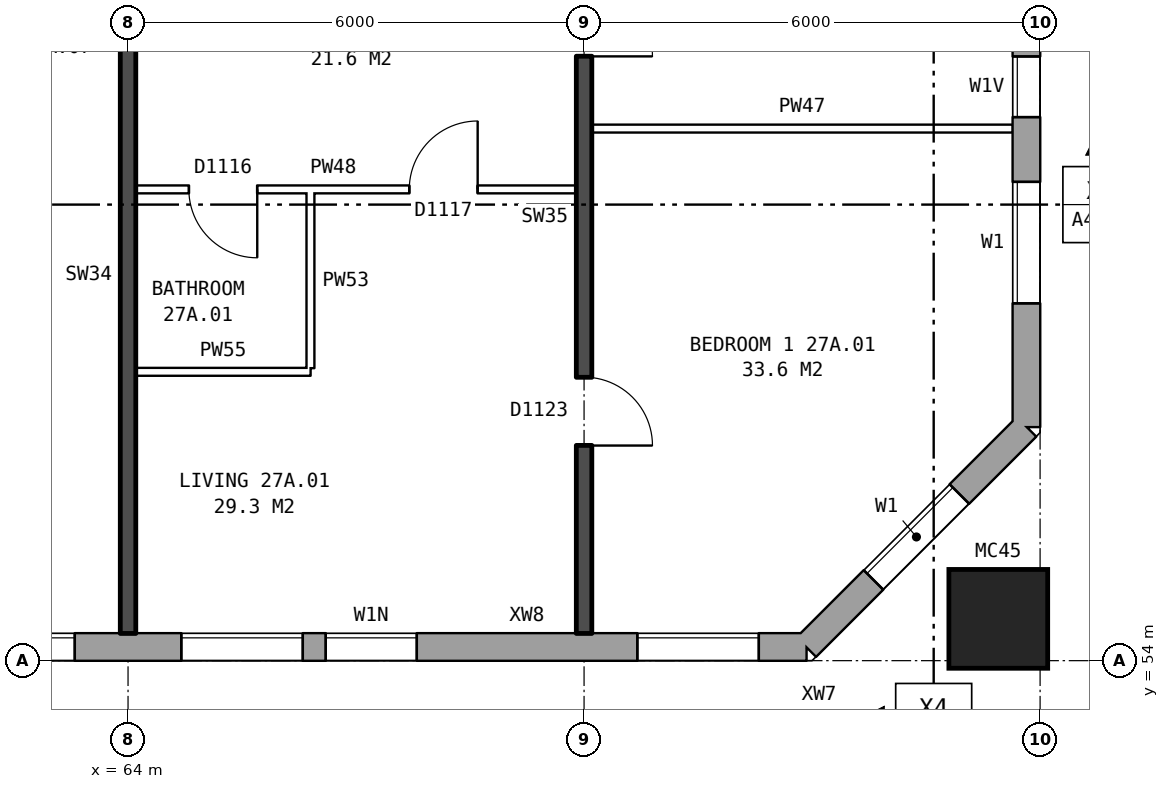
"""IFC4 building model, lengths in metres.
Left out: names, types, materials, properties, quantities, classifications, styles, units other than length and angle.
Written with IfcOpenShell. Run it as: python <this file> out.ifc"""

import sys

from ifc_helpers import new_model, si_unit, direction, frame, frame_2d, origin, origin_2d, place, context, subcontext, project, spatial, rectangle, hollow_rectangle, extrude, element, fill, save


model = new_model("IFC4")
c1 = context("Model", 3, precision=1e-05, world=origin(), true_north=direction((0.0, 1.0)))
c2 = subcontext(c1, "Body", "Model", "MODEL_VIEW")
j1 = project(units=[si_unit("LENGTHUNIT", "METRE"), si_unit("PLANEANGLEUNIT", "RADIAN")], contexts=[c1])
p1 = place(None, origin())
s1 = spatial("IfcSite", under=j1, at=p1, CompositionType="ELEMENT")
p2 = place(p1, origin())
s2 = spatial("IfcBuilding", under=s1, at=p2, CompositionType="ELEMENT")
p3 = place(p2, frame((0.0, 0.0, 99.5)))
s3 = spatial("IfcBuildingStorey", under=s2, at=p3, CompositionType="ELEMENT", Elevation=99.5)
p4 = place(p3, frame((75.45, 54.55, 0.0), z_axis=(0.0, 0.0, 1.0), x_axis=(1.0, 0.0, 0.0)))
e1 = element("IfcColumn", 1, at=p4, inside=s3, PredefinedType="COLUMN", context=c2, shape_type="SweptSolid", body=[
    extrude(hollow_rectangle(XDim=1.3, YDim=1.3, WallThickness=0.07, at=origin_2d()), origin(), (0.0, 0.0, 1.0), 3.1),
])
p5 = place(p3, frame((28.075, 54.18, 0.0), z_axis=(0.0, 0.0, 1.0), x_axis=(1.0, 0.0, 0.0)))
e2 = element("IfcWall", 2, at=p5, inside=s3, PredefinedType="STANDARD", context=c2, shape_type="SweptSolid", body=[
    extrude(rectangle(XDim=44.851, YDim=0.36, at=frame_2d((22.425, 0.0))), origin(), (0.0, 0.0, 1.0), 2.85),
])
p6 = place(p5, frame((0.625, 0.0, 0.8)))
e3 = element("IfcOpeningElement", 3, at=p6, cuts=e2, PredefinedType="OPENING", context=c2, shape_type="SweptSolid", body=[
    extrude(rectangle(XDim=1.6, YDim=1.8, at=frame_2d((0.8, 0.9))), frame((0.0, 0.19, 0.0), z_axis=(0.0, -1.0, 0.0), x_axis=(1.0, 0.0, 0.0)), (0.0, 0.0, 1.0), 0.38),
])
p7 = place(p5, frame((2.55, 0.0, 1.7)))
e4 = element("IfcOpeningElement", 4, at=p7, cuts=e2, PredefinedType="OPENING", context=c2, shape_type="SweptSolid", body=[
    extrude(rectangle(XDim=0.8, YDim=0.9, at=frame_2d((0.4, 0.45))), frame((0.0, 0.19, 0.0), z_axis=(0.0, -1.0, 0.0), x_axis=(1.0, 0.0, 0.0)), (0.0, 0.0, 1.0), 0.38),
])
p8 = place(p5, frame((6.625, 0.0, 0.8)))
e5 = element("IfcOpeningElement", 5, at=p8, cuts=e2, PredefinedType="OPENING", context=c2, shape_type="SweptSolid", body=[
    extrude(rectangle(XDim=1.6, YDim=1.8, at=frame_2d((0.8, 0.9))), frame((0.0, 0.19, 0.0), z_axis=(0.0, -1.0, 0.0), x_axis=(1.0, 0.0, 0.0)), (0.0, 0.0, 1.0), 0.38),
])
p9 = place(p5, frame((9.625, 0.0, 0.8)))
e6 = element("IfcOpeningElement", 6, at=p9, cuts=e2, PredefinedType="OPENING", context=c2, shape_type="SweptSolid", body=[
    extrude(rectangle(XDim=1.6, YDim=1.8, at=frame_2d((0.8, 0.9))), frame((0.0, 0.19, 0.0), z_axis=(0.0, -1.0, 0.0), x_axis=(1.0, 0.0, 0.0)), (0.0, 0.0, 1.0), 0.38),
])
p10 = place(p5, frame((12.625, 0.0, 0.8)))
e7 = element("IfcOpeningElement", 7, at=p10, cuts=e2, PredefinedType="OPENING", context=c2, shape_type="SweptSolid", body=[
    extrude(rectangle(XDim=1.6, YDim=1.8, at=frame_2d((0.8, 0.9))), frame((0.0, 0.19, 0.0), z_axis=(0.0, -1.0, 0.0), x_axis=(1.0, 0.0, 0.0)), (0.0, 0.0, 1.0), 0.38),
])
p11 = place(p5, frame((15.625, 0.0, 0.8)))
e8 = element("IfcOpeningElement", 8, at=p11, cuts=e2, PredefinedType="OPENING", context=c2, shape_type="SweptSolid", body=[
    extrude(rectangle(XDim=1.6, YDim=1.8, at=frame_2d((0.8, 0.9))), frame((0.0, 0.19, 0.0), z_axis=(0.0, -1.0, 0.0), x_axis=(1.0, 0.0, 0.0)), (0.0, 0.0, 1.0), 0.38),
])
p12 = place(p5, frame((18.625, 0.0, 0.8)))
e9 = element("IfcOpeningElement", 9, at=p12, cuts=e2, PredefinedType="OPENING", context=c2, shape_type="SweptSolid", body=[
    extrude(rectangle(XDim=1.6, YDim=1.8, at=frame_2d((0.8, 0.9))), frame((0.0, 0.19, 0.0), z_axis=(0.0, -1.0, 0.0), x_axis=(1.0, 0.0, 0.0)), (0.0, 0.0, 1.0), 0.38),
])
p13 = place(p5, frame((21.625, 0.0, 0.8)))
e10 = element("IfcOpeningElement", 10, at=p13, cuts=e2, PredefinedType="OPENING", context=c2, shape_type="SweptSolid", body=[
    extrude(rectangle(XDim=1.6, YDim=1.8, at=frame_2d((0.8, 0.9))), frame((0.0, 0.19, 0.0), z_axis=(0.0, -1.0, 0.0), x_axis=(1.0, 0.0, 0.0)), (0.0, 0.0, 1.0), 0.38),
])
p14 = place(p5, frame((24.625, 0.0, 0.8)))
e11 = element("IfcOpeningElement", 11, at=p14, cuts=e2, PredefinedType="OPENING", context=c2, shape_type="SweptSolid", body=[
    extrude(rectangle(XDim=1.6, YDim=1.8, at=frame_2d((0.8, 0.9))), frame((0.0, 0.19, 0.0), z_axis=(0.0, -1.0, 0.0), x_axis=(1.0, 0.0, 0.0)), (0.0, 0.0, 1.0), 0.38),
])
p15 = place(p5, frame((27.625, 0.0, 0.8)))
e12 = element("IfcOpeningElement", 12, at=p15, cuts=e2, PredefinedType="OPENING", context=c2, shape_type="SweptSolid", body=[
    extrude(rectangle(XDim=1.6, YDim=1.8, at=frame_2d((0.8, 0.9))), frame((0.0, 0.19, 0.0), z_axis=(0.0, -1.0, 0.0), x_axis=(1.0, 0.0, 0.0)), (0.0, 0.0, 1.0), 0.38),
])
p16 = place(p5, frame((30.625, 0.0, 0.8)))
e13 = element("IfcOpeningElement", 13, at=p16, cuts=e2, PredefinedType="OPENING", context=c2, shape_type="SweptSolid", body=[
    extrude(rectangle(XDim=1.6, YDim=1.8, at=frame_2d((0.8, 0.9))), frame((0.0, 0.19, 0.0), z_axis=(0.0, -1.0, 0.0), x_axis=(1.0, 0.0, 0.0)), (0.0, 0.0, 1.0), 0.38),
])
p17 = place(p5, frame((33.625, 0.0, 0.8)))
e14 = element("IfcOpeningElement", 14, at=p17, cuts=e2, PredefinedType="OPENING", context=c2, shape_type="SweptSolid", body=[
    extrude(rectangle(XDim=1.6, YDim=1.8, at=frame_2d((0.8, 0.9))), frame((0.0, 0.19, 0.0), z_axis=(0.0, -1.0, 0.0), x_axis=(1.0, 0.0, 0.0)), (0.0, 0.0, 1.0), 0.38),
])
p18 = place(p5, frame((36.625, 0.0, 0.8)))
e15 = element("IfcOpeningElement", 15, at=p18, cuts=e2, PredefinedType="OPENING", context=c2, shape_type="SweptSolid", body=[
    extrude(rectangle(XDim=1.6, YDim=1.8, at=frame_2d((0.8, 0.9))), frame((0.0, 0.19, 0.0), z_axis=(0.0, -1.0, 0.0), x_axis=(1.0, 0.0, 0.0)), (0.0, 0.0, 1.0), 0.38),
])
p19 = place(p5, frame((38.525, 0.0, 0.8)))
e16 = element("IfcOpeningElement", 16, at=p19, cuts=e2, PredefinedType="OPENING", context=c2, shape_type="SweptSolid", body=[
    extrude(rectangle(XDim=1.2, YDim=1.2, at=frame_2d((0.6, 0.6))), frame((0.0, 0.19, 0.0), z_axis=(0.0, -1.0, 0.0), x_axis=(1.0, 0.0, 0.0)), (0.0, 0.0, 1.0), 0.38),
])
p20 = place(p5, frame((42.625, 0.0, 0.8)))
e17 = element("IfcOpeningElement", 17, at=p20, cuts=e2, PredefinedType="OPENING", context=c2, shape_type="SweptSolid", body=[
    extrude(rectangle(XDim=1.6, YDim=1.8, at=frame_2d((0.8, 0.9))), frame((0.0, 0.19, 0.0), z_axis=(0.0, -1.0, 0.0), x_axis=(1.0, 0.0, 0.0)), (0.0, 0.0, 1.0), 0.38),
])
p21 = place(p5, frame((4.65, 0.0, 0.8)))
e18 = element("IfcOpeningElement", 18, at=p21, cuts=e2, PredefinedType="OPENING", context=c2, shape_type="SweptSolid", body=[
    extrude(rectangle(XDim=1.0, YDim=0.9, at=frame_2d((0.5, 0.45))), frame((0.0, 0.19, 0.0), z_axis=(0.0, -1.0, 0.0), x_axis=(1.0, 0.0, 0.0)), (0.0, 0.0, 1.0), 0.38),
])
p22 = place(p3, frame((72.925, 54.18, 0.0), z_axis=(0.0, 0.0, 1.0), x_axis=(0.707106781187, 0.707106781187, 0.0)))
e19 = element("IfcWall", 19, at=p22, inside=s3, PredefinedType="STANDARD", context=c2, shape_type="SweptSolid", body=[
    extrude(rectangle(XDim=4.094, YDim=0.36, at=frame_2d((2.047, 0.0))), origin(), (0.0, 0.0, 1.0), 2.85),
])
p23 = place(p22, frame((1.247, 0.0, 0.8)))
e20 = element("IfcOpeningElement", 20, at=p23, cuts=e19, PredefinedType="OPENING", context=c2, shape_type="SweptSolid", body=[
    extrude(rectangle(XDim=1.6, YDim=1.8, at=frame_2d((0.8, 0.9))), frame((0.0, 0.19, 0.0), z_axis=(0.0, -1.0, 0.0), x_axis=(1.0, 0.0, 0.0)), (0.0, 0.0, 1.0), 0.38),
])
p24 = place(p3, frame((75.82, 57.075, 0.0), z_axis=(0.0, 0.0, 1.0), x_axis=(0.0, 1.0, 0.0)))
e21 = element("IfcWall", 21, at=p24, inside=s3, PredefinedType="STANDARD", context=c2, shape_type="SweptSolid", body=[
    extrude(rectangle(XDim=25.851, YDim=0.36, at=frame_2d((12.925, 0.0))), origin(), (0.0, 0.0, 1.0), 2.85),
])
p25 = place(p24, frame((1.625, 0.0, 0.8)))
e22 = element("IfcOpeningElement", 22, at=p25, cuts=e21, PredefinedType="OPENING", context=c2, shape_type="SweptSolid", body=[
    extrude(rectangle(XDim=1.6, YDim=1.8, at=frame_2d((0.8, 0.9))), frame((0.0, 0.19, 0.0), z_axis=(0.0, -1.0, 0.0), x_axis=(1.0, 0.0, 0.0)), (0.0, 0.0, 1.0), 0.38),
])
p26 = place(p24, frame((4.075, 0.0, 1.65)))
e23 = element("IfcOpeningElement", 23, at=p26, cuts=e21, PredefinedType="OPENING", context=c2, shape_type="SweptSolid", body=[
    extrude(rectangle(XDim=0.8, YDim=0.9, at=frame_2d((0.4, 0.45))), frame((0.0, 0.19, 0.0), z_axis=(0.0, -1.0, 0.0), x_axis=(1.0, 0.0, 0.0)), (0.0, 0.0, 1.0), 0.38),
])
p27 = place(p24, frame((20.775, 0.0, 1.7)))
e24 = element("IfcOpeningElement", 24, at=p27, cuts=e21, PredefinedType="OPENING", context=c2, shape_type="SweptSolid", body=[
    extrude(rectangle(XDim=1.4, YDim=0.9, at=frame_2d((0.7, 0.45))), frame((0.0, 0.19, 0.0), z_axis=(0.0, -1.0, 0.0), x_axis=(1.0, 0.0, 0.0)), (0.0, 0.0, 1.0), 0.38),
])
p28 = place(p24, frame((22.625, 0.0, 0.8)))
e25 = element("IfcOpeningElement", 25, at=p28, cuts=e21, PredefinedType="OPENING", context=c2, shape_type="SweptSolid", body=[
    extrude(rectangle(XDim=1.6, YDim=1.8, at=frame_2d((0.8, 0.9))), frame((0.0, 0.19, 0.0), z_axis=(0.0, -1.0, 0.0), x_axis=(1.0, 0.0, 0.0)), (0.0, 0.0, 1.0), 0.38),
])
p29 = place(p24, frame((5.575, 0.0, 0.45)))
e26 = element("IfcOpeningElement", 26, at=p29, cuts=e21, PredefinedType="OPENING", context=c2, shape_type="SweptSolid", body=[
    extrude(rectangle(XDim=1.0, YDim=0.9, at=frame_2d((0.5, 0.45))), frame((0.0, 0.19, 0.0), z_axis=(0.0, -1.0, 0.0), x_axis=(1.0, 0.0, 0.0)), (0.0, 0.0, 1.0), 0.38),
])
p30 = place(p3, frame((64.1, 57.8, 0.0), z_axis=(0.0, 0.0, 1.0), x_axis=(1.0, 0.0, 0.0)))
e27 = element("IfcWall", 27, at=p30, inside=s3, PredefinedType="PARTITIONING", context=c2, shape_type="SweptSolid", body=[
    extrude(rectangle(XDim=2.3, YDim=0.1, at=frame_2d((1.15, 0.0))), origin(), (0.0, 0.0, 1.0), 2.85),
])
p31 = place(p3, frame((64.1, 60.2, 0.0), z_axis=(0.0, 0.0, 1.0), x_axis=(1.0, 0.0, 0.0)))
e28 = element("IfcWall", 28, at=p31, inside=s3, PredefinedType="PARTITIONING", context=c2, shape_type="SweptSolid", body=[
    extrude(rectangle(XDim=5.8, YDim=0.1, at=frame_2d((2.9, 0.0))), origin(), (0.0, 0.0, 1.0), 2.85),
])
p32 = place(p31, frame((3.6, 0.0, 0.0)))
e29 = element("IfcOpeningElement", 29, at=p32, cuts=e28, PredefinedType="OPENING", context=c2, shape_type="SweptSolid", body=[
    extrude(rectangle(XDim=0.9, YDim=2.1, at=frame_2d((0.45, 1.05))), frame((0.0, 0.06, 0.0), z_axis=(0.0, -1.0, 0.0), x_axis=(1.0, 0.0, 0.0)), (0.0, 0.0, 1.0), 0.12),
])
p33 = place(p31, frame((0.7, 0.0, 0.0)))
e30 = element("IfcOpeningElement", 30, at=p33, cuts=e28, PredefinedType="OPENING", context=c2, shape_type="SweptSolid", body=[
    extrude(rectangle(XDim=0.9, YDim=2.1, at=frame_2d((0.45, 1.05))), frame((0.0, 0.06, 0.0), z_axis=(0.0, -1.0, 0.0), x_axis=(1.0, 0.0, 0.0)), (0.0, 0.0, 1.0), 0.12),
])
p34 = place(p3, frame((70.1, 61.0, 0.0), z_axis=(0.0, 0.0, 1.0), x_axis=(1.0, 0.0, 0.0)))
e31 = element("IfcWall", 31, at=p34, inside=s3, PredefinedType="PARTITIONING", context=c2, shape_type="SweptSolid", body=[
    extrude(rectangle(XDim=5.54, YDim=0.1, at=frame_2d((2.77, 0.0))), origin(), (0.0, 0.0, 1.0), 2.85),
])
p35 = place(p3, frame((64.0, 54.36, 0.0), z_axis=(0.0, 0.0, 1.0), x_axis=(0.0, 1.0, 0.0)))
e32 = element("IfcWall", 32, at=p35, inside=s3, PredefinedType="SOLIDWALL", context=c2, shape_type="SweptSolid", body=[
    extrude(rectangle(XDim=9.44, YDim=0.2, at=frame_2d((4.72, 0.0))), origin(), (0.0, 0.0, 1.0), 2.85),
])
p36 = place(p3, frame((66.4, 57.85, 0.0), z_axis=(0.0, 0.0, 1.0), x_axis=(0.0, 1.0, 0.0)))
e33 = element("IfcWall", 33, at=p36, inside=s3, PredefinedType="PARTITIONING", context=c2, shape_type="SweptSolid", body=[
    extrude(rectangle(XDim=2.3, YDim=0.1, at=frame_2d((1.15, 0.0))), origin(), (0.0, 0.0, 1.0), 2.85),
])
p37 = place(p3, frame((70.0, 54.36, 0.0), z_axis=(0.0, 0.0, 1.0), x_axis=(0.0, 1.0, 0.0)))
e34 = element("IfcWall", 34, at=p37, inside=s3, PredefinedType="SOLIDWALL", context=c2, shape_type="SweptSolid", body=[
    extrude(rectangle(XDim=9.44, YDim=0.2, at=frame_2d((4.72, 0.0))), origin(), (0.0, 0.0, 1.0), 2.85),
])
p38 = place(p37, frame((2.47, 0.0, 0.0)))
e35 = element("IfcOpeningElement", 35, at=p38, cuts=e34, PredefinedType="OPENING", context=c2, shape_type="SweptSolid", body=[
    extrude(rectangle(XDim=0.9, YDim=2.1, at=frame_2d((0.45, 1.05))), frame((0.0, 0.11, 0.0), z_axis=(0.0, -1.0, 0.0), x_axis=(1.0, 0.0, 0.0)), (0.0, 0.0, 1.0), 0.22),
])
p39 = place(p37, frame((7.59, 0.0, 0.0)))
e36 = element("IfcOpeningElement", 36, at=p39, cuts=e34, PredefinedType="OPENING", context=c2, shape_type="SweptSolid", body=[
    extrude(rectangle(XDim=0.9, YDim=2.1, at=frame_2d((0.45, 1.05))), frame((0.0, 0.11, 0.0), z_axis=(0.0, -1.0, 0.0), x_axis=(1.0, 0.0, 0.0)), (0.0, 0.0, 1.0), 0.22),
])
p40 = place(p17, origin())
e37 = element("IfcWindow", 37, at=p40, inside=s3, PartitioningType="SINGLE_PANEL", PredefinedType="WINDOW", context=c2, shape_type="SweptSolid", body=[
    extrude(rectangle(XDim=1.6, YDim=1.8, at=frame_2d((0.8, 0.9))), frame((0.0, 0.15, 0.0), z_axis=(0.0, -1.0, 0.0), x_axis=(1.0, 0.0, 0.0)), (0.0, 0.0, 1.0), 0.06),
])
fill(e14, e37)
p41 = place(p18, origin())
e38 = element("IfcWindow", 38, at=p41, inside=s3, PartitioningType="SINGLE_PANEL", PredefinedType="WINDOW", context=c2, shape_type="SweptSolid", body=[
    extrude(rectangle(XDim=1.6, YDim=1.8, at=frame_2d((0.8, 0.9))), frame((0.0, 0.15, 0.0), z_axis=(0.0, -1.0, 0.0), x_axis=(1.0, 0.0, 0.0)), (0.0, 0.0, 1.0), 0.06),
])
fill(e15, e38)
p42 = place(p19, origin())
e39 = element("IfcWindow", 39, at=p42, inside=s3, PartitioningType="SINGLE_PANEL", PredefinedType="WINDOW", context=c2, shape_type="SweptSolid", body=[
    extrude(rectangle(XDim=1.2, YDim=1.2, at=frame_2d((0.6, 0.6))), frame((0.0, 0.15, 0.0), z_axis=(0.0, -1.0, 0.0), x_axis=(1.0, 0.0, 0.0)), (0.0, 0.0, 1.0), 0.06),
])
fill(e16, e39)
p43 = place(p20, origin())
e40 = element("IfcWindow", 40, at=p43, inside=s3, PartitioningType="SINGLE_PANEL", PredefinedType="WINDOW", context=c2, shape_type="SweptSolid", body=[
    extrude(rectangle(XDim=1.6, YDim=1.8, at=frame_2d((0.8, 0.9))), frame((0.0, 0.15, 0.0), z_axis=(0.0, -1.0, 0.0), x_axis=(1.0, 0.0, 0.0)), (0.0, 0.0, 1.0), 0.06),
])
fill(e17, e40)
p44 = place(p23, origin())
e41 = element("IfcWindow", 41, at=p44, inside=s3, PartitioningType="SINGLE_PANEL", PredefinedType="WINDOW", context=c2, shape_type="SweptSolid", body=[
    extrude(rectangle(XDim=1.6, YDim=1.8, at=frame_2d((0.8, 0.9))), frame((0.0, 0.15, 0.0), z_axis=(0.0, -1.0, 0.0), x_axis=(1.0, 0.0, 0.0)), (0.0, 0.0, 1.0), 0.06),
])
fill(e20, e41)
p45 = place(p25, origin())
e42 = element("IfcWindow", 42, at=p45, inside=s3, PartitioningType="SINGLE_PANEL", PredefinedType="WINDOW", context=c2, shape_type="SweptSolid", body=[
    extrude(rectangle(XDim=1.6, YDim=1.8, at=frame_2d((0.8, 0.9))), frame((0.0, 0.15, 0.0), z_axis=(0.0, -1.0, 0.0), x_axis=(1.0, 0.0, 0.0)), (0.0, 0.0, 1.0), 0.06),
])
fill(e22, e42)
p46 = place(p26, origin())
e43 = element("IfcWindow", 43, at=p46, inside=s3, PartitioningType="SINGLE_PANEL", PredefinedType="WINDOW", context=c2, shape_type="SweptSolid", body=[
    extrude(rectangle(XDim=0.8, YDim=0.9, at=frame_2d((0.4, 0.45))), frame((0.0, 0.15, 0.0), z_axis=(0.0, -1.0, 0.0), x_axis=(1.0, 0.0, 0.0)), (0.0, 0.0, 1.0), 0.06),
])
fill(e23, e43)
p47 = place(p38, frame((0.9, 0.0, 0.0), z_axis=(0.0, 0.0, 1.0), x_axis=(-1.0, 0.0, 0.0)))
e44 = element("IfcDoor", 44, at=p47, inside=s3, OperationType="SINGLE_SWING_RIGHT", PredefinedType="DOOR", context=c2, shape_type="SweptSolid", body=[
    extrude(rectangle(XDim=0.9, YDim=2.1, at=frame_2d((0.45, 1.05))), frame((0.0, 0.025, 0.0), z_axis=(0.0, -1.0, 0.0), x_axis=(1.0, 0.0, 0.0)), (0.0, 0.0, 1.0), 0.05),
])
fill(e35, e44)
p48 = place(p39, frame((0.9, 0.0, 0.0), z_axis=(0.0, 0.0, 1.0), x_axis=(-1.0, 0.0, 0.0)))
e45 = element("IfcDoor", 45, at=p48, inside=s3, OperationType="SINGLE_SWING_RIGHT", PredefinedType="DOOR", context=c2, shape_type="SweptSolid", body=[
    extrude(rectangle(XDim=0.9, YDim=2.1, at=frame_2d((0.45, 1.05))), frame((0.0, 0.025, 0.0), z_axis=(0.0, -1.0, 0.0), x_axis=(1.0, 0.0, 0.0)), (0.0, 0.0, 1.0), 0.05),
])
fill(e36, e45)
p49 = place(p32, origin())
e46 = element("IfcDoor", 46, at=p49, inside=s3, OperationType="SINGLE_SWING_RIGHT", PredefinedType="DOOR", context=c2, shape_type="SweptSolid", body=[
    extrude(rectangle(XDim=0.9, YDim=2.1, at=frame_2d((0.45, 1.05))), frame((0.0, 0.025, 0.0), z_axis=(0.0, -1.0, 0.0), x_axis=(1.0, 0.0, 0.0)), (0.0, 0.0, 1.0), 0.05),
])
fill(e29, e46)
p50 = place(p33, frame((0.9, 0.0, 0.0), z_axis=(0.0, 0.0, 1.0), x_axis=(-1.0, 0.0, 0.0)))
e47 = element("IfcDoor", 47, at=p50, inside=s3, OperationType="SINGLE_SWING_LEFT", PredefinedType="DOOR", context=c2, shape_type="SweptSolid", body=[
    extrude(rectangle(XDim=0.9, YDim=2.1, at=frame_2d((0.45, 1.05))), frame((0.0, 0.025, 0.0), z_axis=(0.0, -1.0, 0.0), x_axis=(1.0, 0.0, 0.0)), (0.0, 0.0, 1.0), 0.05),
])
fill(e30, e47)
save(model, sys.argv[1])
